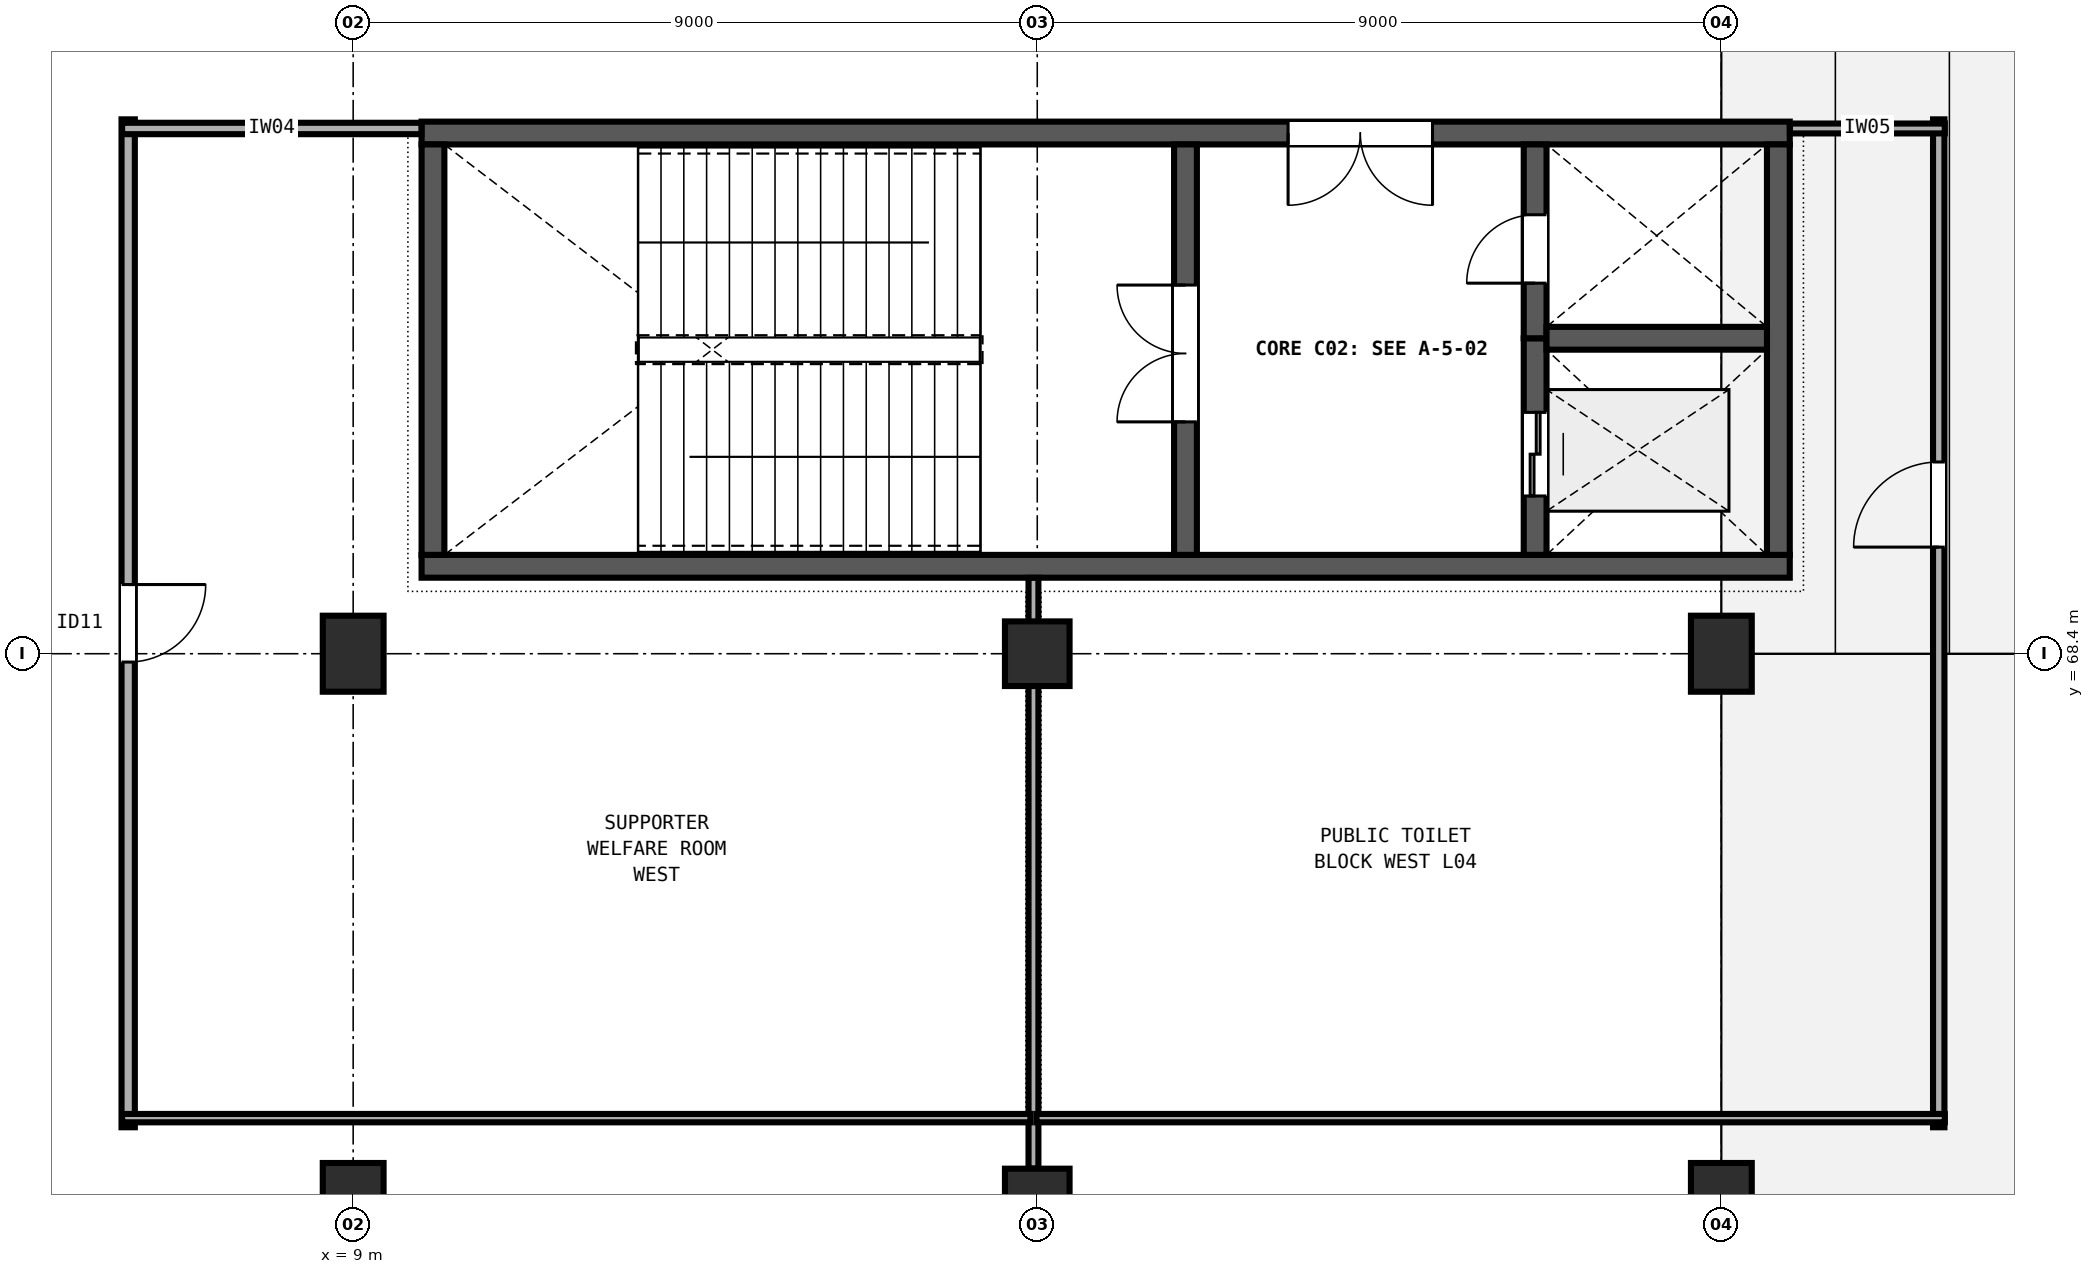
"""IFC4 building model, lengths in metres.
Left out: names, types, materials, properties, quantities, classifications, styles, units other than length and angle.
Written with IfcOpenShell. Run it as: python <this file> out.ifc"""

import sys

from ifc_helpers import new_model, si_unit, direction, frame, frame_2d, origin, origin_2d, place, context, subcontext, project, spatial, rectangle, extrude, element, fill, save


model = new_model("IFC4")
c1 = context("Model", 3, precision=1e-05, world=origin(), true_north=direction((0.0, 1.0)))
c2 = subcontext(c1, "Body", "Model", "MODEL_VIEW")
j1 = project(units=[si_unit("LENGTHUNIT", "METRE"), si_unit("PLANEANGLEUNIT", "RADIAN")], contexts=[c1])
p1 = place(None, origin())
s1 = spatial("IfcSite", under=j1, at=p1, CompositionType="ELEMENT")
p2 = place(p1, origin())
s2 = spatial("IfcBuilding", under=s1, at=p2, CompositionType="ELEMENT")
p3 = place(p2, frame((0.0, 0.0, 19.2)))
s3 = spatial("IfcBuildingStorey", under=s2, at=p3, CompositionType="ELEMENT", Elevation=19.2)
for number, where, z_axis, x_axis in (
    (1, (9.0, 61.2, 0.0), (0.0, 0.0, 1.0), (1.0, 0.0, 0.0)),
    (2, (9.0, 68.4, 0.0), (0.0, 0.0, 1.0), (1.0, 0.0, 0.0)),
):
    element("IfcColumn", number, at=place(p3, frame(where, z_axis=z_axis, x_axis=x_axis)), inside=s3, PredefinedType="COLUMN", context=c2, shape_type="SweptSolid", body=[
        extrude(rectangle(XDim=0.8, YDim=1.0, at=origin_2d()), origin(), (0.0, 0.0, 1.0), 4.8),
    ])
for number, where, z_axis, x_axis in (
    (3, (18.0, 61.2, 0.0), (0.0, 0.0, 1.0), (1.0, 0.0, 0.0)),
    (4, (18.0, 68.4, 0.0), (0.0, 0.0, 1.0), (1.0, 0.0, 0.0)),
):
    element("IfcColumn", number, at=place(p3, frame(where, z_axis=z_axis, x_axis=x_axis)), inside=s3, PredefinedType="COLUMN", context=c2, shape_type="SweptSolid", body=[
        extrude(rectangle(XDim=0.85, YDim=0.85, at=origin_2d()), origin(), (0.0, 0.0, 1.0), 4.8),
    ])
for number, where, z_axis, x_axis in (
    (5, (27.0, 61.2, 0.0), (0.0, 0.0, 1.0), (1.0, 0.0, 0.0)),
    (6, (27.0, 68.4, 0.0), (0.0, 0.0, 1.0), (1.0, 0.0, 0.0)),
):
    element("IfcColumn", number, at=place(p3, frame(where, z_axis=z_axis, x_axis=x_axis)), inside=s3, PredefinedType="COLUMN", context=c2, shape_type="SweptSolid", body=[
        extrude(rectangle(XDim=0.8, YDim=1.0, at=origin_2d()), origin(), (0.0, 0.0, 1.0), 4.8),
    ])
p4 = place(p3, frame((9.9, 69.55, 0.0), z_axis=(0.0, 0.0, 1.0), x_axis=(1.0, 0.0, 0.0)))
e7 = element("IfcWall", 7, at=p4, inside=s3, PredefinedType="SHEAR", context=c2, shape_type="SweptSolid", body=[
    extrude(rectangle(XDim=18.0, YDim=0.3, at=frame_2d((9.0, 0.0))), origin(), (0.0, 0.0, 1.0), 4.55),
])
p5 = place(p3, frame((27.9, 75.25, 0.0), z_axis=(0.0, 0.0, 1.0), x_axis=(-1.0, 0.0, 0.0)))
e8 = element("IfcWall", 8, at=p5, inside=s3, PredefinedType="SHEAR", context=c2, shape_type="SweptSolid", body=[
    extrude(rectangle(XDim=18.0, YDim=0.3, at=frame_2d((9.0, 0.0))), origin(), (0.0, 0.0, 1.0), 4.55),
])
p6 = place(p5, frame((4.7, 0.0, 0.0)))
e9 = element("IfcOpeningElement", 9, at=p6, cuts=e8, PredefinedType="OPENING", context=c2, shape_type="SweptSolid", body=[
    extrude(rectangle(XDim=1.9, YDim=2.25, at=frame_2d((0.95, 1.125))), frame((0.0, 0.16, 0.0), z_axis=(0.0, -1.0, 0.0), x_axis=(1.0, 0.0, 0.0)), (0.0, 0.0, 1.0), 0.32),
])
for number, where, z_axis, x_axis in (
    (10, (10.05, 75.1, 0.0), (0.0, 0.0, 1.0), (0.0, -1.0, 0.0)),
    (11, (27.75, 69.7, 0.0), (0.0, 0.0, 1.0), (0.0, 1.0, 0.0)),
):
    element("IfcWall", number, at=place(p3, frame(where, z_axis=z_axis, x_axis=x_axis)), inside=s3, PredefinedType="SHEAR", context=c2, shape_type="SweptSolid", body=[
        extrude(rectangle(XDim=5.4, YDim=0.3, at=frame_2d((2.7, 0.0))), origin(), (0.0, 0.0, 1.0), 4.55),
    ])
p7 = place(p3, frame((19.95, 69.7, 0.0), z_axis=(0.0, 0.0, 1.0), x_axis=(0.0, 1.0, 0.0)))
e12 = element("IfcWall", 12, at=p7, inside=s3, PredefinedType="SHEAR", context=c2, shape_type="SweptSolid", body=[
    extrude(rectangle(XDim=5.4, YDim=0.3, at=frame_2d((2.7, 0.0))), origin(), (0.0, 0.0, 1.0), 4.55),
])
p8 = place(p7, frame((1.75, 0.0, 0.0)))
e13 = element("IfcOpeningElement", 13, at=p8, cuts=e12, PredefinedType="OPENING", context=c2, shape_type="SweptSolid", body=[
    extrude(rectangle(XDim=1.8, YDim=2.25, at=frame_2d((0.9, 1.125))), frame((0.0, 0.16, 0.0), z_axis=(0.0, -1.0, 0.0), x_axis=(1.0, 0.0, 0.0)), (0.0, 0.0, 1.0), 0.32),
])
p9 = place(p3, frame((24.55, 69.7, 0.0), z_axis=(0.0, 0.0, 1.0), x_axis=(0.0, 1.0, 0.0)))
e14 = element("IfcWall", 14, at=p9, inside=s3, PredefinedType="SHEAR", context=c2, shape_type="SweptSolid", body=[
    extrude(rectangle(XDim=2.85, YDim=0.3, at=frame_2d((1.425, 0.0))), origin(), (0.0, 0.0, 1.0), 4.55),
])
p10 = place(p9, frame((0.775, 0.0, 0.0)))
e15 = element("IfcOpeningElement", 15, at=p10, cuts=e14, PredefinedType="OPENING", context=c2, shape_type="SweptSolid", body=[
    extrude(rectangle(XDim=1.1, YDim=2.1, at=frame_2d((0.55, 1.05))), frame((0.0, 0.16, 0.0), z_axis=(0.0, -1.0, 0.0), x_axis=(1.0, 0.0, 0.0)), (0.0, 0.0, 1.0), 0.32),
])
p11 = place(p3, frame((24.55, 72.55, 0.0), z_axis=(0.0, 0.0, 1.0), x_axis=(0.0, 1.0, 0.0)))
e16 = element("IfcWall", 16, at=p11, inside=s3, PredefinedType="SHEAR", context=c2, shape_type="SweptSolid", body=[
    extrude(rectangle(XDim=2.55, YDim=0.3, at=frame_2d((1.275, 0.0))), origin(), (0.0, 0.0, 1.0), 4.55),
])
p12 = place(p11, frame((0.725, 0.0, 0.0)))
e17 = element("IfcOpeningElement", 17, at=p12, cuts=e16, PredefinedType="OPENING", context=c2, shape_type="SweptSolid", body=[
    extrude(rectangle(XDim=0.9, YDim=2.1, at=frame_2d((0.45, 1.05))), frame((0.0, 0.16, 0.0), z_axis=(0.0, -1.0, 0.0), x_axis=(1.0, 0.0, 0.0)), (0.0, 0.0, 1.0), 0.32),
])
p13 = place(p3, frame((24.7, 72.55, 0.0), z_axis=(0.0, 0.0, 1.0), x_axis=(1.0, 0.0, 0.0)))
e18 = element("IfcWall", 18, at=p13, inside=s3, PredefinedType="SHEAR", context=c2, shape_type="SweptSolid", body=[
    extrude(rectangle(XDim=2.9, YDim=0.3, at=frame_2d((1.45, 0.0))), origin(), (0.0, 0.0, 1.0), 4.55),
])
p14 = place(p3, frame((6.04, 75.43, 0.0), z_axis=(0.0, 0.0, 1.0), x_axis=(0.0, -1.0, 0.0)))
e19 = element("IfcWall", 19, at=p14, inside=s3, PredefinedType="PARTITIONING", context=c2, shape_type="SweptSolid", body=[
    extrude(rectangle(XDim=13.26, YDim=0.175, at=frame_2d((6.63, 0.0))), origin(), (0.0, 0.0, 1.0), 3.28),
])
p15 = place(p14, frame((6.12, 0.0, 0.0)))
e20 = element("IfcOpeningElement", 20, at=p15, cuts=e19, PredefinedType="OPENING", context=c2, shape_type="SweptSolid", body=[
    extrude(rectangle(XDim=1.02, YDim=2.16, at=frame_2d((0.51, 1.08))), frame((0.0, 0.097, 0.0), z_axis=(0.0, -1.0, 0.0), x_axis=(1.0, 0.0, 0.0)), (0.0, 0.0, 1.0), 0.195),
])
p16 = place(p3, frame((5.96, 75.31, 0.0), z_axis=(0.0, 0.0, 1.0), x_axis=(1.0, 0.0, 0.0)))
e21 = element("IfcWall", 21, at=p16, inside=s3, PredefinedType="PARTITIONING", context=c2, shape_type="SweptSolid", body=[
    extrude(rectangle(XDim=3.938, YDim=0.15, at=frame_2d((1.969, 0.0))), origin(), (0.0, 0.0, 1.0), 3.28),
])
p17 = place(p3, frame((17.95, 69.398, 0.0), z_axis=(0.0, 0.0, 1.0), x_axis=(0.0, -1.0, 0.0)))
e22 = element("IfcWall", 22, at=p17, inside=s3, PredefinedType="PARTITIONING", context=c2, shape_type="SweptSolid", body=[
    extrude(rectangle(XDim=7.771, YDim=0.13, at=frame_2d((3.885, 0.0))), origin(), (0.0, 0.0, 1.0), 3.28),
])
p18 = place(p3, frame((17.91, 62.29, 0.0), z_axis=(0.0, 0.0, 1.0), x_axis=(-1.0, 0.0, 0.0)))
e23 = element("IfcWall", 23, at=p18, inside=s3, PredefinedType="PARTITIONING", context=c2, shape_type="SweptSolid", body=[
    extrude(rectangle(XDim=11.95, YDim=0.11, at=frame_2d((5.975, 0.0))), origin(), (0.0, 0.0, 1.0), 3.28),
])
p19 = place(p3, frame((29.86, 62.17, 0.0), z_axis=(0.0, 0.0, 1.0), x_axis=(0.0, 1.0, 0.0)))
e24 = element("IfcWall", 24, at=p19, inside=s3, PredefinedType="PARTITIONING", context=c2, shape_type="SweptSolid", body=[
    extrude(rectangle(XDim=13.26, YDim=0.15, at=frame_2d((6.63, 0.0))), origin(), (0.0, 0.0, 1.0), 3.28),
])
p20 = place(p19, frame((7.632, 0.0, 0.0)))
e25 = element("IfcOpeningElement", 25, at=p20, cuts=e24, PredefinedType="OPENING", context=c2, shape_type="SweptSolid", body=[
    extrude(rectangle(XDim=1.12, YDim=2.22, at=frame_2d((0.56, 1.11))), frame((0.0, 0.085, 0.0), z_axis=(0.0, -1.0, 0.0), x_axis=(1.0, 0.0, 0.0)), (0.0, 0.0, 1.0), 0.17),
])
p21 = place(p3, frame((27.902, 75.31, 0.0), z_axis=(0.0, 0.0, 1.0), x_axis=(1.0, 0.0, 0.0)))
e26 = element("IfcWall", 26, at=p21, inside=s3, PredefinedType="PARTITIONING", context=c2, shape_type="SweptSolid", body=[
    extrude(rectangle(XDim=2.038, YDim=0.13, at=frame_2d((1.019, 0.0))), origin(), (0.0, 0.0, 1.0), 3.28),
])
p22 = place(p3, frame((29.94, 62.29, 0.0), z_axis=(0.0, 0.0, 1.0), x_axis=(-1.0, 0.0, 0.0)))
e27 = element("IfcWall", 27, at=p22, inside=s3, PredefinedType="PARTITIONING", context=c2, shape_type="SweptSolid", body=[
    extrude(rectangle(XDim=11.95, YDim=0.11, at=frame_2d((5.975, 0.0))), origin(), (0.0, 0.0, 1.0), 3.28),
])
p23 = place(p8, origin())
e28 = element("IfcDoor", 28, at=p23, inside=s3, OperationType="DOUBLE_DOOR_SINGLE_SWING", PredefinedType="DOOR", context=c2, shape_type="SweptSolid", body=[
    extrude(rectangle(XDim=1.8, YDim=2.25, at=frame_2d((0.9, 1.125))), frame((0.0, 0.025, 0.0), z_axis=(0.0, -1.0, 0.0), x_axis=(1.0, 0.0, 0.0)), (0.0, 0.0, 1.0), 0.05),
])
fill(e13, e28)
p24 = place(p12, origin())
e29 = element("IfcDoor", 29, at=p24, inside=s3, OperationType="SINGLE_SWING_LEFT", PredefinedType="DOOR", context=c2, shape_type="SweptSolid", body=[
    extrude(rectangle(XDim=0.9, YDim=2.1, at=frame_2d((0.45, 1.05))), frame((0.0, 0.025, 0.0), z_axis=(0.0, -1.0, 0.0), x_axis=(1.0, 0.0, 0.0)), (0.0, 0.0, 1.0), 0.05),
])
fill(e17, e29)
p25 = place(p10, origin())
e30 = element("IfcDoor", 30, at=p25, inside=s3, OperationType="DOUBLE_DOOR_SLIDING", PredefinedType="DOOR", context=c2, shape_type="SweptSolid", body=[
    extrude(rectangle(XDim=1.1, YDim=2.1, at=frame_2d((0.55, 1.05))), frame((0.0, 0.025, 0.0), z_axis=(0.0, -1.0, 0.0), x_axis=(1.0, 0.0, 0.0)), (0.0, 0.0, 1.0), 0.05),
])
fill(e15, e30)
p26 = place(p6, origin())
e31 = element("IfcDoor", 31, at=p26, inside=s3, OperationType="DOUBLE_DOOR_SINGLE_SWING", PredefinedType="DOOR", context=c2, shape_type="SweptSolid", body=[
    extrude(rectangle(XDim=1.9, YDim=2.25, at=frame_2d((0.95, 1.125))), frame((0.0, 0.025, 0.0), z_axis=(0.0, -1.0, 0.0), x_axis=(1.0, 0.0, 0.0)), (0.0, 0.0, 1.0), 0.05),
])
fill(e9, e31)
p27 = place(p15, origin())
e32 = element("IfcDoor", 32, at=p27, inside=s3, OperationType="SINGLE_SWING_LEFT", PredefinedType="DOOR", context=c2, shape_type="SweptSolid", body=[
    extrude(rectangle(XDim=1.02, YDim=2.16, at=frame_2d((0.51, 1.08))), frame((0.0, 0.025, 0.0), z_axis=(0.0, -1.0, 0.0), x_axis=(1.0, 0.0, 0.0)), (0.0, 0.0, 1.0), 0.05),
])
fill(e20, e32)
p28 = place(p20, origin())
e33 = element("IfcDoor", 33, at=p28, inside=s3, OperationType="SINGLE_SWING_LEFT", PredefinedType="DOOR", context=c2, shape_type="SweptSolid", body=[
    extrude(rectangle(XDim=1.12, YDim=2.22, at=frame_2d((0.56, 1.11))), frame((0.0, 0.025, 0.0), z_axis=(0.0, -1.0, 0.0), x_axis=(1.0, 0.0, 0.0)), (0.0, 0.0, 1.0), 0.05),
])
fill(e25, e33)
save(model, sys.argv[1])
